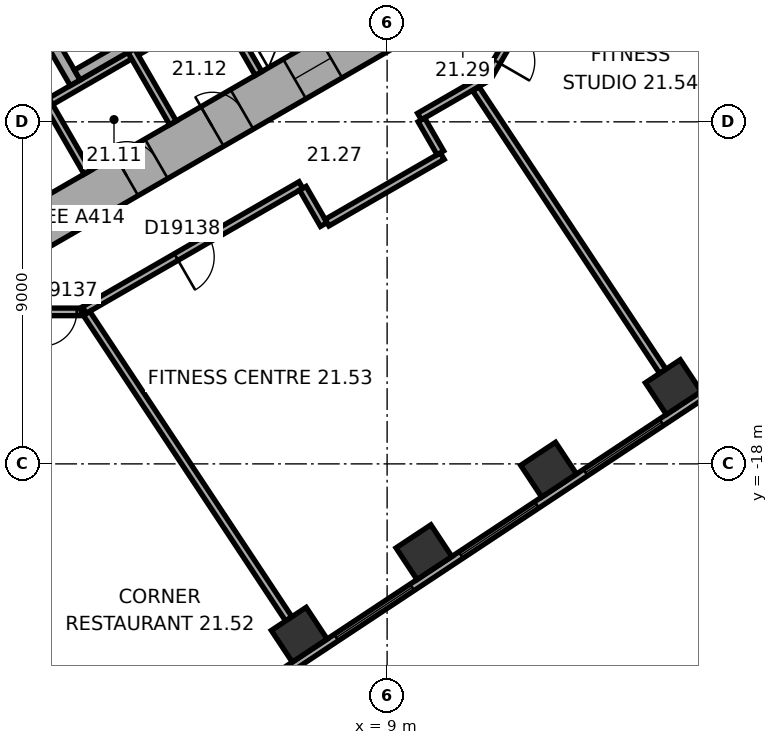
"""IFC4 building model, lengths in metres.
Left out: names, types, materials, properties, quantities, classifications, styles, units other than length and angle.
Written with IfcOpenShell. Run it as: python <this file> out.ifc"""

import sys

from ifc_helpers import new_model, si_unit, direction, frame, frame_2d, origin, origin_2d, place, context, subcontext, project, spatial, rectangle, extrude, element, fill, save


model = new_model("IFC4")
c1 = context("Model", 3, precision=1e-05, world=origin(), true_north=direction((0.0, 1.0)))
c2 = subcontext(c1, "Body", "Model", "MODEL_VIEW")
j1 = project(units=[si_unit("LENGTHUNIT", "METRE"), si_unit("PLANEANGLEUNIT", "RADIAN")], contexts=[c1])
p1 = place(None, origin())
s1 = spatial("IfcSite", under=j1, at=p1, CompositionType="ELEMENT")
p2 = place(p1, origin())
s2 = spatial("IfcBuilding", under=s1, at=p2, CompositionType="ELEMENT")
p3 = place(p2, frame((0.0, 0.0, 93.5)))
s3 = spatial("IfcBuildingStorey", under=s2, at=p3, CompositionType="ELEMENT", Elevation=93.5)
for number, where, z_axis, x_axis in (
    (1, (6.688, -22.496, 0.0), (0.0, 0.0, 1.0), (0.834, 0.552, 0.0)),
    (2, (9.969, -20.324, 0.0), (0.0, 0.0, 1.0), (0.834, 0.552, 0.0)),
    (3, (13.25, -18.152, 0.0), (0.0, 0.0, 1.0), (0.834, 0.552, 0.0)),
    (4, (16.531, -15.981, 0.0), (0.0, 0.0, 1.0), (0.834, 0.552, 0.0)),
):
    element("IfcColumn", number, at=place(p3, frame(where, z_axis=z_axis, x_axis=x_axis)), inside=s3, PredefinedType="COLUMN", context=c2, shape_type="SweptSolid", body=[
        extrude(rectangle(XDim=1.1, YDim=1.0, at=origin_2d()), origin(), (0.0, 0.0, 1.0), 3.3),
    ])
p4 = place(p3, frame((-10.4, -5.658, 0.0), z_axis=(0.0, 0.0, 1.0), x_axis=(0.866021384402, -0.500006961711, 0.0)))
e5 = element("IfcWall", 5, at=p4, inside=s3, PredefinedType="SHEAR", context=c2, shape_type="SweptSolid", body=[
    extrude(rectangle(XDim=12.355, YDim=1.2, at=frame_2d((6.178, 0.0))), origin(), (0.0, 0.0, 1.0), 3.3),
])
p5 = place(p4, frame((6.378, 0.0, 0.0)))
e6 = element("IfcOpeningElement", 6, at=p5, cuts=e5, PredefinedType="OPENING", context=c2, shape_type="SweptSolid", body=[
    extrude(rectangle(XDim=1.5, YDim=2.1, at=frame_2d((0.75, 1.05))), frame((0.0, 0.61, 0.0), z_axis=(0.0, -1.0, 0.0), x_axis=(1.0, 0.0, 0.0)), (0.0, 0.0, 1.0), 1.22),
])
p6 = place(p4, frame((3.228, 0.0, 0.0)))
e7 = element("IfcOpeningElement", 7, at=p6, cuts=e5, PredefinedType="OPENING", context=c2, shape_type="SweptSolid", body=[
    extrude(rectangle(XDim=0.9, YDim=2.1, at=frame_2d((0.45, 1.05))), frame((0.0, 0.61, 0.0), z_axis=(0.0, -1.0, 0.0), x_axis=(1.0, 0.0, 0.0)), (0.0, 0.0, 1.0), 1.22),
])
p7 = place(p3, frame((-0.3, -11.836, 0.0), z_axis=(0.0, 0.0, 1.0), x_axis=(0.866021384402, 0.500006961711, 0.0)))
e8 = element("IfcWall", 8, at=p7, inside=s3, PredefinedType="SHEAR", context=c2, shape_type="SweptSolid", body=[
    extrude(rectangle(XDim=12.355, YDim=1.2, at=frame_2d((6.178, 0.0))), origin(), (0.0, 0.0, 1.0), 3.3),
])
p8 = place(p7, frame((2.828, 0.0, 0.0)))
e9 = element("IfcOpeningElement", 9, at=p8, cuts=e8, PredefinedType="OPENING", context=c2, shape_type="SweptSolid", body=[
    extrude(rectangle(XDim=0.9, YDim=2.1, at=frame_2d((0.45, 1.05))), frame((0.0, 0.61, 0.0), z_axis=(0.0, -1.0, 0.0), x_axis=(1.0, 0.0, 0.0)), (0.0, 0.0, 1.0), 1.22),
])
p9 = place(p7, frame((5.428, 0.0, 0.0)))
e10 = element("IfcOpeningElement", 10, at=p9, cuts=e8, PredefinedType="OPENING", context=c2, shape_type="SweptSolid", body=[
    extrude(rectangle(XDim=0.9, YDim=2.1, at=frame_2d((0.45, 1.05))), frame((0.0, 0.61, 0.0), z_axis=(0.0, -1.0, 0.0), x_axis=(1.0, 0.0, 0.0)), (0.0, 0.0, 1.0), 1.22),
])
p10 = place(p7, frame((7.928, 0.0, 0.0)))
e11 = element("IfcOpeningElement", 11, at=p10, cuts=e8, PredefinedType="OPENING", context=c2, shape_type="SweptSolid", body=[
    extrude(rectangle(XDim=1.1, YDim=2.1, at=frame_2d((0.55, 1.05))), frame((0.0, 0.61, 0.0), z_axis=(0.0, -1.0, 0.0), x_axis=(1.0, 0.0, 0.0)), (0.0, 0.0, 1.0), 1.22),
])
p11 = place(p3, frame((3.083, -25.601, 0.0), z_axis=(0.0, 0.0, 1.0), x_axis=(0.833884295743, 0.551939291329, 0.0)))
e12 = element("IfcWall", 12, at=p11, inside=s3, PredefinedType="STANDARD", context=c2, shape_type="SweptSolid", body=[
    extrude(rectangle(XDim=21.246, YDim=0.2, at=frame_2d((10.623, 0.0))), origin(), (0.0, 0.0, 1.0), 3.3),
])
p12 = place(p11, frame((1.553, 0.0, 0.8)))
e13 = element("IfcOpeningElement", 13, at=p12, cuts=e12, PredefinedType="OPENING", context=c2, shape_type="SweptSolid", body=[
    extrude(rectangle(XDim=2.4, YDim=1.7, at=frame_2d((1.2, 0.85))), frame((0.0, 0.11, 0.0), z_axis=(0.0, -1.0, 0.0), x_axis=(1.0, 0.0, 0.0)), (0.0, 0.0, 1.0), 0.22),
])
p13 = place(p11, frame((5.488, 0.0, 0.8)))
e14 = element("IfcOpeningElement", 14, at=p13, cuts=e12, PredefinedType="OPENING", context=c2, shape_type="SweptSolid", body=[
    extrude(rectangle(XDim=2.4, YDim=1.7, at=frame_2d((1.2, 0.85))), frame((0.0, 0.11, 0.0), z_axis=(0.0, -1.0, 0.0), x_axis=(1.0, 0.0, 0.0)), (0.0, 0.0, 1.0), 0.22),
])
p14 = place(p11, frame((9.422, 0.0, 0.8)))
e15 = element("IfcOpeningElement", 15, at=p14, cuts=e12, PredefinedType="OPENING", context=c2, shape_type="SweptSolid", body=[
    extrude(rectangle(XDim=2.4, YDim=1.7, at=frame_2d((1.2, 0.85))), frame((0.0, 0.11, 0.0), z_axis=(0.0, -1.0, 0.0), x_axis=(1.0, 0.0, 0.0)), (0.0, 0.0, 1.0), 0.22),
])
p15 = place(p11, frame((13.357, 0.0, 0.8)))
e16 = element("IfcOpeningElement", 16, at=p15, cuts=e12, PredefinedType="OPENING", context=c2, shape_type="SweptSolid", body=[
    extrude(rectangle(XDim=2.4, YDim=1.7, at=frame_2d((1.2, 0.85))), frame((0.0, 0.11, 0.0), z_axis=(0.0, -1.0, 0.0), x_axis=(1.0, 0.0, 0.0)), (0.0, 0.0, 1.0), 0.22),
])
p16 = place(p11, frame((17.291, 0.0, 0.8)))
e17 = element("IfcOpeningElement", 17, at=p16, cuts=e12, PredefinedType="OPENING", context=c2, shape_type="SweptSolid", body=[
    extrude(rectangle(XDim=2.4, YDim=1.7, at=frame_2d((1.2, 0.85))), frame((0.0, 0.11, 0.0), z_axis=(0.0, -1.0, 0.0), x_axis=(1.0, 0.0, 0.0)), (0.0, 0.0, 1.0), 0.22),
])
p17 = place(p3, frame((-0.024, -8.559, 0.0), z_axis=(0.0, 0.0, 1.0), x_axis=(0.866026010844, 0.49999894854, 0.0)))
e18 = element("IfcWall", 18, at=p17, inside=s3, PredefinedType="PARTITIONING", context=c2, shape_type="SweptSolid", body=[
    extrude(rectangle(XDim=8.0, YDim=0.2, at=frame_2d((4.0, 0.0))), origin(), (0.0, 0.0, 1.0), 3.05),
])
for number, where, z_axis, x_axis in (
    (19, (0.013, -8.422, 0.0), (0.0, 0.0, 1.0), (0.5, -0.866, 0.0)),
    (20, (2.264, -7.122, 0.0), (0.0, 0.0, 1.0), (0.5, -0.866, 0.0)),
    (21, (4.516, -5.822, 0.0), (0.0, 0.0, 1.0), (0.5, -0.866, 0.0)),
):
    element("IfcWall", number, at=place(p3, frame(where, z_axis=z_axis, x_axis=x_axis)), inside=s3, PredefinedType="PARTITIONING", context=c2, shape_type="SweptSolid", body=[
        extrude(rectangle(XDim=2.2, YDim=0.2, at=frame_2d((1.1, 0.0))), origin(), (0.0, 0.0, 1.0), 3.05),
    ])
p18 = place(p3, frame((-1.558, -3.902, 0.0), z_axis=(0.0, 0.0, 1.0), x_axis=(0.499977259774, -0.866038532462, 0.0)))
e22 = element("IfcWall", 22, at=p18, inside=s3, PredefinedType="SHEAR", context=c2, shape_type="SweptSolid", body=[
    extrude(rectangle(XDim=4.7, YDim=0.3, at=frame_2d((2.35, 0.0))), origin(), (0.0, 0.0, 1.0), 3.05),
])
p19 = place(p18, frame((0.8, 0.0, 0.0)))
e23 = element("IfcOpeningElement", 23, at=p19, cuts=e22, PredefinedType="OPENING", context=c2, shape_type="SweptSolid", body=[
    extrude(rectangle(XDim=1.2, YDim=2.1, at=frame_2d((0.6, 1.05))), frame((0.0, 0.16, 0.0), z_axis=(0.0, -1.0, 0.0), x_axis=(1.0, 0.0, 0.0)), (0.0, 0.0, 1.0), 0.32),
])
p20 = place(p3, frame((0.847, -7.767, 0.0), z_axis=(0.0, 0.0, 1.0), x_axis=(0.866027801685, 0.499995846692, 0.0)))
e24 = element("IfcWall", 24, at=p20, inside=s3, PredefinedType="SHEAR", context=c2, shape_type="SweptSolid", body=[
    extrude(rectangle(XDim=7.06, YDim=0.3, at=frame_2d((3.53, 0.0))), origin(), (0.0, 0.0, 1.0), 3.05),
])
p21 = place(p3, frame((-0.186, -14.001, 0.0), z_axis=(0.0, 0.0, 1.0), x_axis=(1.0, 0.0, 0.0)))
e25 = element("IfcWall", 25, at=p21, inside=s3, PredefinedType="PARTITIONING", context=c2, shape_type="SweptSolid", body=[
    extrude(rectangle(XDim=1.136, YDim=0.2, at=frame_2d((0.568, 0.0))), origin(), (0.0, 0.0, 1.0), 3.05),
])
p22 = place(p21, frame((0.118, 0.0, 0.0)))
e26 = element("IfcOpeningElement", 26, at=p22, cuts=e25, PredefinedType="OPENING", context=c2, shape_type="SweptSolid", body=[
    extrude(rectangle(XDim=0.9, YDim=2.1, at=frame_2d((0.45, 1.05))), frame((0.0, 0.11, 0.0), z_axis=(0.0, -1.0, 0.0), x_axis=(1.0, 0.0, 0.0)), (0.0, 0.0, 1.0), 0.22),
])
p23 = place(p3, frame((1.033, -13.953, 0.0), z_axis=(0.0, 0.0, 1.0), x_axis=(0.866017531406, 0.500013635111, 0.0)))
e27 = element("IfcWall", 27, at=p23, inside=s3, PredefinedType="PARTITIONING", context=c2, shape_type="SweptSolid", body=[
    extrude(rectangle(XDim=6.58, YDim=0.2, at=frame_2d((3.29, 0.0))), origin(), (0.0, 0.0, 1.0), 3.05),
])
p24 = place(p23, frame((2.79, 0.0, 0.0)))
e28 = element("IfcOpeningElement", 28, at=p24, cuts=e27, PredefinedType="OPENING", context=c2, shape_type="SweptSolid", body=[
    extrude(rectangle(XDim=1.0, YDim=2.1, at=frame_2d((0.5, 1.05))), frame((0.0, 0.11, 0.0), z_axis=(0.0, -1.0, 0.0), x_axis=(1.0, 0.0, 0.0)), (0.0, 0.0, 1.0), 0.22),
])
p25 = place(p3, frame((6.412, -22.079, 0.0), z_axis=(0.0, 0.0, 1.0), x_axis=(-0.551919507115, 0.83389739037, 0.0)))
e29 = element("IfcWall", 29, at=p25, inside=s3, PredefinedType="PARTITIONING", context=c2, shape_type="SweptSolid", body=[
    extrude(rectangle(XDim=9.635, YDim=0.2, at=frame_2d((4.817, 0.0))), origin(), (0.0, 0.0, 1.0), 3.05),
])
p26 = place(p3, frame((6.782, -10.749, 0.0), z_axis=(0.0, 0.0, 1.0), x_axis=(0.500074377092, -0.865982457891, 0.0)))
e30 = element("IfcWall", 30, at=p26, inside=s3, PredefinedType="PARTITIONING", context=c2, shape_type="SweptSolid", body=[
    extrude(rectangle(XDim=1.101, YDim=0.2, at=frame_2d((0.55, 0.0))), origin(), (0.0, 0.0, 1.0), 3.05),
])
p27 = place(p3, frame((7.419, -11.653, 0.0), z_axis=(0.0, 0.0, 1.0), x_axis=(0.866038154057, 0.49997791523, 0.0)))
e31 = element("IfcWall", 31, at=p27, inside=s3, PredefinedType="PARTITIONING", context=c2, shape_type="SweptSolid", body=[
    extrude(rectangle(XDim=3.502, YDim=0.2, at=frame_2d((1.751, 0.0))), origin(), (0.0, 0.0, 1.0), 3.05),
])
p28 = place(p3, frame((9.852, -8.861, 0.0), z_axis=(0.0, 0.0, 1.0), x_axis=(0.866013291437, 0.500020978615, 0.0)))
e32 = element("IfcWall", 32, at=p28, inside=s3, PredefinedType="PARTITIONING", context=c2, shape_type="SweptSolid", body=[
    extrude(rectangle(XDim=2.077, YDim=0.2, at=frame_2d((1.038, 0.0))), origin(), (0.0, 0.0, 1.0), 3.05),
])
p29 = place(p3, frame((10.402, -9.815, 0.0), z_axis=(0.0, 0.0, 1.0), x_axis=(-0.499968756647, 0.866043441391, 0.0)))
e33 = element("IfcWall", 33, at=p29, inside=s3, PredefinedType="PARTITIONING", context=c2, shape_type="SweptSolid", body=[
    extrude(rectangle(XDim=1.001, YDim=0.2, at=frame_2d((0.5, 0.0))), origin(), (0.0, 0.0, 1.0), 3.05),
])
p30 = place(p3, frame((11.67, -7.788, 0.0), z_axis=(0.0, 0.0, 1.0), x_axis=(0.500063286585, 0.865988862174, 0.0)))
e34 = element("IfcWall", 34, at=p30, inside=s3, PredefinedType="PARTITIONING", context=c2, shape_type="SweptSolid", body=[
    extrude(rectangle(XDim=1.86, YDim=0.2, at=frame_2d((0.93, 0.0))), origin(), (0.0, 0.0, 1.0), 3.05),
])
p31 = place(p30, frame((0.43, 0.0, 0.0)))
e35 = element("IfcOpeningElement", 35, at=p31, cuts=e34, PredefinedType="OPENING", context=c2, shape_type="SweptSolid", body=[
    extrude(rectangle(XDim=1.0, YDim=2.1, at=frame_2d((0.5, 1.05))), frame((0.0, 0.11, 0.0), z_axis=(0.0, -1.0, 0.0), x_axis=(1.0, 0.0, 0.0)), (0.0, 0.0, 1.0), 0.22),
])
p32 = place(p3, frame((16.255, -15.564, 0.0), z_axis=(0.0, 0.0, 1.0), x_axis=(-0.55192208744, 0.833895682562, 0.0)))
e36 = element("IfcWall", 36, at=p32, inside=s3, PredefinedType="PARTITIONING", context=c2, shape_type="SweptSolid", body=[
    extrude(rectangle(XDim=8.913, YDim=0.2, at=frame_2d((4.457, 0.0))), origin(), (0.0, 0.0, 1.0), 2.6),
])
p33 = place(p13, origin())
e37 = element("IfcWindow", 37, at=p33, inside=s3, PartitioningType="SINGLE_PANEL", PredefinedType="WINDOW", context=c2, shape_type="SweptSolid", body=[
    extrude(rectangle(XDim=2.4, YDim=1.7, at=frame_2d((1.2, 0.85))), frame((0.0, 0.03, 0.0), z_axis=(0.0, -1.0, 0.0), x_axis=(1.0, 0.0, 0.0)), (0.0, 0.0, 1.0), 0.06),
])
fill(e14, e37)
p34 = place(p14, origin())
e38 = element("IfcWindow", 38, at=p34, inside=s3, PartitioningType="SINGLE_PANEL", PredefinedType="WINDOW", context=c2, shape_type="SweptSolid", body=[
    extrude(rectangle(XDim=2.4, YDim=1.7, at=frame_2d((1.2, 0.85))), frame((0.0, 0.03, 0.0), z_axis=(0.0, -1.0, 0.0), x_axis=(1.0, 0.0, 0.0)), (0.0, 0.0, 1.0), 0.06),
])
fill(e15, e38)
p35 = place(p15, origin())
e39 = element("IfcWindow", 39, at=p35, inside=s3, PartitioningType="SINGLE_PANEL", PredefinedType="WINDOW", context=c2, shape_type="SweptSolid", body=[
    extrude(rectangle(XDim=2.4, YDim=1.7, at=frame_2d((1.2, 0.85))), frame((0.0, 0.03, 0.0), z_axis=(0.0, -1.0, 0.0), x_axis=(1.0, 0.0, 0.0)), (0.0, 0.0, 1.0), 0.06),
])
fill(e16, e39)
p36 = place(p8, origin())
e40 = element("IfcDoor", 40, at=p36, inside=s3, OperationType="SINGLE_SWING_LEFT", PredefinedType="DOOR", context=c2, shape_type="SweptSolid", body=[
    extrude(rectangle(XDim=0.9, YDim=2.1, at=frame_2d((0.45, 1.05))), frame((0.0, 0.025, 0.0), z_axis=(0.0, -1.0, 0.0), x_axis=(1.0, 0.0, 0.0)), (0.0, 0.0, 1.0), 0.05),
])
fill(e9, e40)
p37 = place(p9, origin())
e41 = element("IfcDoor", 41, at=p37, inside=s3, OperationType="SINGLE_SWING_LEFT", PredefinedType="DOOR", context=c2, shape_type="SweptSolid", body=[
    extrude(rectangle(XDim=0.9, YDim=2.1, at=frame_2d((0.45, 1.05))), frame((0.0, 0.025, 0.0), z_axis=(0.0, -1.0, 0.0), x_axis=(1.0, 0.0, 0.0)), (0.0, 0.0, 1.0), 0.05),
])
fill(e10, e41)
p38 = place(p10, origin())
e42 = element("IfcDoor", 42, at=p38, inside=s3, OperationType="DOUBLE_DOOR_SLIDING", PredefinedType="DOOR", context=c2, shape_type="SweptSolid", body=[
    extrude(rectangle(XDim=1.1, YDim=2.1, at=frame_2d((0.55, 1.05))), frame((0.0, 0.025, 0.0), z_axis=(0.0, -1.0, 0.0), x_axis=(1.0, 0.0, 0.0)), (0.0, 0.0, 1.0), 0.05),
])
fill(e11, e42)
p39 = place(p22, origin())
e43 = element("IfcDoor", 43, at=p39, inside=s3, OperationType="SINGLE_SWING_LEFT", PredefinedType="DOOR", context=c2, shape_type="SweptSolid", body=[
    extrude(rectangle(XDim=0.9, YDim=2.1, at=frame_2d((0.45, 1.05))), frame((0.0, 0.025, 0.0), z_axis=(0.0, -1.0, 0.0), x_axis=(1.0, 0.0, 0.0)), (0.0, 0.0, 1.0), 0.05),
])
fill(e26, e43)
p40 = place(p24, origin())
e44 = element("IfcDoor", 44, at=p40, inside=s3, OperationType="SINGLE_SWING_LEFT", PredefinedType="DOOR", context=c2, shape_type="SweptSolid", body=[
    extrude(rectangle(XDim=1.0, YDim=2.1, at=frame_2d((0.5, 1.05))), frame((0.0, 0.025, 0.0), z_axis=(0.0, -1.0, 0.0), x_axis=(1.0, 0.0, 0.0)), (0.0, 0.0, 1.0), 0.05),
])
fill(e28, e44)
p41 = place(p31, origin())
e45 = element("IfcDoor", 45, at=p41, inside=s3, OperationType="SINGLE_SWING_LEFT", PredefinedType="DOOR", context=c2, shape_type="SweptSolid", body=[
    extrude(rectangle(XDim=1.0, YDim=2.1, at=frame_2d((0.5, 1.05))), frame((0.0, 0.025, 0.0), z_axis=(0.0, -1.0, 0.0), x_axis=(1.0, 0.0, 0.0)), (0.0, 0.0, 1.0), 0.05),
])
fill(e35, e45)
save(model, sys.argv[1])
